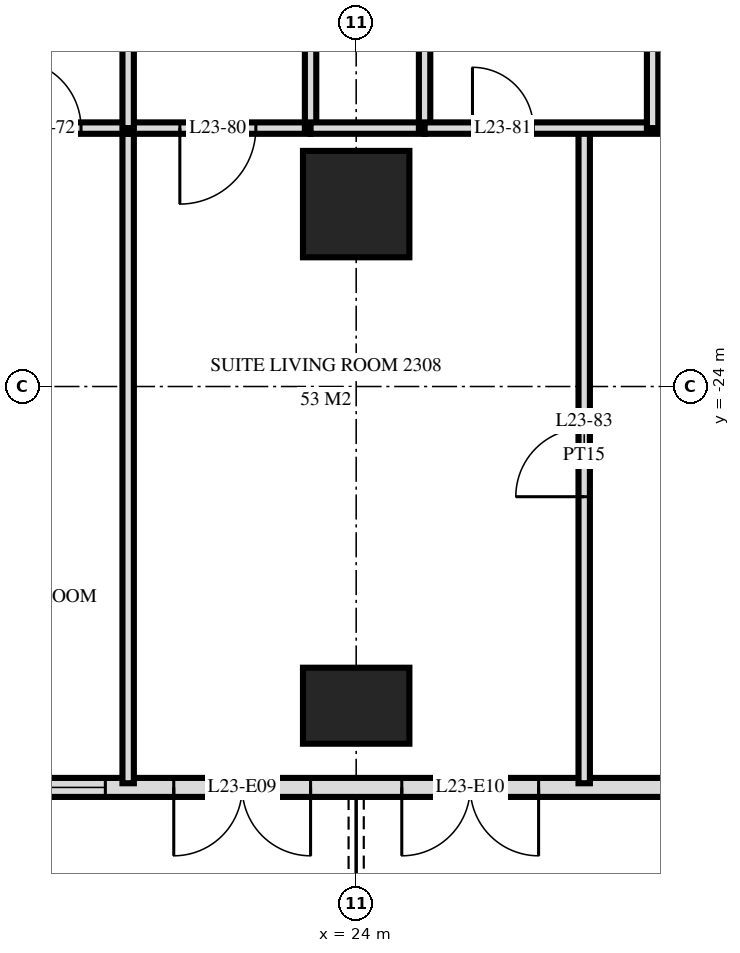
"""IFC4 building model, lengths in metres.
Left out: names, types, materials, properties, quantities, classifications, styles, units other than length and angle.
Written with IfcOpenShell. Run it as: python <this file> out.ifc"""

import sys

from ifc_helpers import new_model, si_unit, direction, frame, frame_2d, origin, origin_2d, place, context, subcontext, project, spatial, rectangle, extrude, element, fill, save


model = new_model("IFC4")
c1 = context("Model", 3, precision=1e-05, world=origin(), true_north=direction((0.0, 1.0)))
c2 = subcontext(c1, "Body", "Model", "MODEL_VIEW")
j1 = project(units=[si_unit("LENGTHUNIT", "METRE"), si_unit("PLANEANGLEUNIT", "RADIAN")], contexts=[c1])
p1 = place(None, origin())
s1 = spatial("IfcSite", under=j1, at=p1, CompositionType="ELEMENT")
p2 = place(p1, origin())
s2 = spatial("IfcBuilding", under=s1, at=p2, CompositionType="ELEMENT")
p3 = place(p2, frame((0.0, 0.0, 92.4)))
s3 = spatial("IfcBuildingStorey", under=s2, at=p3, CompositionType="ELEMENT", Elevation=92.4)
p4 = place(p3, frame((24.0, -28.2, 0.0), z_axis=(0.0, 0.0, 1.0), x_axis=(1.0, 0.0, 0.0)))
e1 = element("IfcColumn", 1, at=p4, inside=s3, PredefinedType="COLUMN", context=c2, shape_type="SweptSolid", body=[
    extrude(rectangle(XDim=1.4, YDim=1.0, at=origin_2d()), origin(), (0.0, 0.0, 1.0), 3.6),
])
p5 = place(p3, frame((24.0, -21.6, 0.0), z_axis=(0.0, 0.0, 1.0), x_axis=(1.0, 0.0, 0.0)))
e2 = element("IfcColumn", 2, at=p5, inside=s3, PredefinedType="COLUMN", context=c2, shape_type="SweptSolid", body=[
    extrude(rectangle(XDim=1.4, YDim=1.4, at=origin_2d()), origin(), (0.0, 0.0, 1.0), 3.6),
])
p6 = place(p3, frame((-28.775, -29.275, 0.0), z_axis=(0.0, 0.0, 1.0), x_axis=(1.0, 0.0, 0.0)))
e3 = element("IfcWall", 3, at=p6, inside=s3, PredefinedType="SOLIDWALL", context=c2, shape_type="SweptSolid", body=[
    extrude(rectangle(XDim=57.551, YDim=0.25, at=frame_2d((28.775, 0.0))), origin(), (0.0, 0.0, 1.0), 3.32),
])
p7 = place(p6, frame((0.575, 0.0, 0.0)))
e4 = element("IfcOpeningElement", 4, at=p7, cuts=e3, PredefinedType="OPENING", context=c2, shape_type="SweptSolid", body=[
    extrude(rectangle(XDim=1.8, YDim=2.4, at=frame_2d((0.9, 1.2))), frame((0.0, 0.135, 0.0), z_axis=(0.0, -1.0, 0.0), x_axis=(1.0, 0.0, 0.0)), (0.0, 0.0, 1.0), 0.27),
])
p8 = place(p6, frame((5.075, 0.0, 0.3)))
e5 = element("IfcOpeningElement", 5, at=p8, cuts=e3, PredefinedType="OPENING", context=c2, shape_type="SweptSolid", body=[
    extrude(rectangle(XDim=2.4, YDim=2.1, at=frame_2d((1.2, 1.05))), frame((0.0, 0.135, 0.0), z_axis=(0.0, -1.0, 0.0), x_axis=(1.0, 0.0, 0.0)), (0.0, 0.0, 1.0), 0.27),
])
p9 = place(p6, frame((8.375, 0.0, 0.0)))
e6 = element("IfcOpeningElement", 6, at=p9, cuts=e3, PredefinedType="OPENING", context=c2, shape_type="SweptSolid", body=[
    extrude(rectangle(XDim=1.8, YDim=2.4, at=frame_2d((0.9, 1.2))), frame((0.0, 0.135, 0.0), z_axis=(0.0, -1.0, 0.0), x_axis=(1.0, 0.0, 0.0)), (0.0, 0.0, 1.0), 0.27),
])
p10 = place(p6, frame((11.375, 0.0, 0.0)))
e7 = element("IfcOpeningElement", 7, at=p10, cuts=e3, PredefinedType="OPENING", context=c2, shape_type="SweptSolid", body=[
    extrude(rectangle(XDim=1.8, YDim=2.4, at=frame_2d((0.9, 1.2))), frame((0.0, 0.135, 0.0), z_axis=(0.0, -1.0, 0.0), x_axis=(1.0, 0.0, 0.0)), (0.0, 0.0, 1.0), 0.27),
])
p11 = place(p6, frame((14.075, 0.0, 0.3)))
e8 = element("IfcOpeningElement", 8, at=p11, cuts=e3, PredefinedType="OPENING", context=c2, shape_type="SweptSolid", body=[
    extrude(rectangle(XDim=2.4, YDim=2.1, at=frame_2d((1.2, 1.05))), frame((0.0, 0.135, 0.0), z_axis=(0.0, -1.0, 0.0), x_axis=(1.0, 0.0, 0.0)), (0.0, 0.0, 1.0), 0.27),
])
p12 = place(p6, frame((17.375, 0.0, 0.0)))
e9 = element("IfcOpeningElement", 9, at=p12, cuts=e3, PredefinedType="OPENING", context=c2, shape_type="SweptSolid", body=[
    extrude(rectangle(XDim=1.8, YDim=2.4, at=frame_2d((0.9, 1.2))), frame((0.0, 0.135, 0.0), z_axis=(0.0, -1.0, 0.0), x_axis=(1.0, 0.0, 0.0)), (0.0, 0.0, 1.0), 0.27),
])
p13 = place(p6, frame((20.075, 0.0, 0.3)))
e10 = element("IfcOpeningElement", 10, at=p13, cuts=e3, PredefinedType="OPENING", context=c2, shape_type="SweptSolid", body=[
    extrude(rectangle(XDim=2.4, YDim=2.1, at=frame_2d((1.2, 1.05))), frame((0.0, 0.135, 0.0), z_axis=(0.0, -1.0, 0.0), x_axis=(1.0, 0.0, 0.0)), (0.0, 0.0, 1.0), 0.27),
])
p14 = place(p6, frame((23.075, 0.0, 0.3)))
e11 = element("IfcOpeningElement", 11, at=p14, cuts=e3, PredefinedType="OPENING", context=c2, shape_type="SweptSolid", body=[
    extrude(rectangle(XDim=2.4, YDim=2.1, at=frame_2d((1.2, 1.05))), frame((0.0, 0.135, 0.0), z_axis=(0.0, -1.0, 0.0), x_axis=(1.0, 0.0, 0.0)), (0.0, 0.0, 1.0), 0.27),
])
p15 = place(p6, frame((26.375, 0.0, 0.0)))
e12 = element("IfcOpeningElement", 12, at=p15, cuts=e3, PredefinedType="OPENING", context=c2, shape_type="SweptSolid", body=[
    extrude(rectangle(XDim=1.8, YDim=2.4, at=frame_2d((0.9, 1.2))), frame((0.0, 0.135, 0.0), z_axis=(0.0, -1.0, 0.0), x_axis=(1.0, 0.0, 0.0)), (0.0, 0.0, 1.0), 0.27),
])
p16 = place(p6, frame((29.375, 0.0, 0.0)))
e13 = element("IfcOpeningElement", 13, at=p16, cuts=e3, PredefinedType="OPENING", context=c2, shape_type="SweptSolid", body=[
    extrude(rectangle(XDim=1.8, YDim=2.4, at=frame_2d((0.9, 1.2))), frame((0.0, 0.135, 0.0), z_axis=(0.0, -1.0, 0.0), x_axis=(1.0, 0.0, 0.0)), (0.0, 0.0, 1.0), 0.27),
])
p17 = place(p6, frame((32.075, 0.0, 0.3)))
e14 = element("IfcOpeningElement", 14, at=p17, cuts=e3, PredefinedType="OPENING", context=c2, shape_type="SweptSolid", body=[
    extrude(rectangle(XDim=2.4, YDim=2.1, at=frame_2d((1.2, 1.05))), frame((0.0, 0.135, 0.0), z_axis=(0.0, -1.0, 0.0), x_axis=(1.0, 0.0, 0.0)), (0.0, 0.0, 1.0), 0.27),
])
p18 = place(p6, frame((35.375, 0.0, 0.0)))
e15 = element("IfcOpeningElement", 15, at=p18, cuts=e3, PredefinedType="OPENING", context=c2, shape_type="SweptSolid", body=[
    extrude(rectangle(XDim=1.8, YDim=2.4, at=frame_2d((0.9, 1.2))), frame((0.0, 0.135, 0.0), z_axis=(0.0, -1.0, 0.0), x_axis=(1.0, 0.0, 0.0)), (0.0, 0.0, 1.0), 0.27),
])
p19 = place(p6, frame((38.075, 0.0, 0.3)))
e16 = element("IfcOpeningElement", 16, at=p19, cuts=e3, PredefinedType="OPENING", context=c2, shape_type="SweptSolid", body=[
    extrude(rectangle(XDim=2.4, YDim=2.1, at=frame_2d((1.2, 1.05))), frame((0.0, 0.135, 0.0), z_axis=(0.0, -1.0, 0.0), x_axis=(1.0, 0.0, 0.0)), (0.0, 0.0, 1.0), 0.27),
])
p20 = place(p6, frame((41.075, 0.0, 0.3)))
e17 = element("IfcOpeningElement", 17, at=p20, cuts=e3, PredefinedType="OPENING", context=c2, shape_type="SweptSolid", body=[
    extrude(rectangle(XDim=2.4, YDim=2.1, at=frame_2d((1.2, 1.05))), frame((0.0, 0.135, 0.0), z_axis=(0.0, -1.0, 0.0), x_axis=(1.0, 0.0, 0.0)), (0.0, 0.0, 1.0), 0.27),
])
p21 = place(p6, frame((44.375, 0.0, 0.0)))
e18 = element("IfcOpeningElement", 18, at=p21, cuts=e3, PredefinedType="OPENING", context=c2, shape_type="SweptSolid", body=[
    extrude(rectangle(XDim=1.8, YDim=2.4, at=frame_2d((0.9, 1.2))), frame((0.0, 0.135, 0.0), z_axis=(0.0, -1.0, 0.0), x_axis=(1.0, 0.0, 0.0)), (0.0, 0.0, 1.0), 0.27),
])
p22 = place(p6, frame((47.075, 0.0, 0.3)))
e19 = element("IfcOpeningElement", 19, at=p22, cuts=e3, PredefinedType="OPENING", context=c2, shape_type="SweptSolid", body=[
    extrude(rectangle(XDim=2.4, YDim=2.1, at=frame_2d((1.2, 1.05))), frame((0.0, 0.135, 0.0), z_axis=(0.0, -1.0, 0.0), x_axis=(1.0, 0.0, 0.0)), (0.0, 0.0, 1.0), 0.27),
])
p23 = place(p6, frame((50.375, 0.0, 0.0)))
e20 = element("IfcOpeningElement", 20, at=p23, cuts=e3, PredefinedType="OPENING", context=c2, shape_type="SweptSolid", body=[
    extrude(rectangle(XDim=1.8, YDim=2.4, at=frame_2d((0.9, 1.2))), frame((0.0, 0.135, 0.0), z_axis=(0.0, -1.0, 0.0), x_axis=(1.0, 0.0, 0.0)), (0.0, 0.0, 1.0), 0.27),
])
p24 = place(p6, frame((53.375, 0.0, 0.0)))
e21 = element("IfcOpeningElement", 21, at=p24, cuts=e3, PredefinedType="OPENING", context=c2, shape_type="SweptSolid", body=[
    extrude(rectangle(XDim=1.8, YDim=2.4, at=frame_2d((0.9, 1.2))), frame((0.0, 0.135, 0.0), z_axis=(0.0, -1.0, 0.0), x_axis=(1.0, 0.0, 0.0)), (0.0, 0.0, 1.0), 0.27),
])
p25 = place(p3, frame((27.9, -20.6, 0.0), z_axis=(0.0, 0.0, 1.0), x_axis=(0.0, 1.0, 0.0)))
e22 = element("IfcWall", 22, at=p25, inside=s3, PredefinedType="PARTITIONING", context=c2, shape_type="SweptSolid", body=[
    extrude(rectangle(XDim=3.6, YDim=0.15, at=frame_2d((1.8, 0.0))), origin(), (0.0, 0.0, 1.0), 3.32),
])
p26 = place(p3, frame((27.0, -29.22, 0.0), z_axis=(0.0, 0.0, 1.0), x_axis=(0.0, 1.0, 0.0)))
e23 = element("IfcWall", 23, at=p26, inside=s3, PredefinedType="PARTITIONING", context=c2, shape_type="SweptSolid", body=[
    extrude(rectangle(XDim=8.62, YDim=0.15, at=frame_2d((4.31, 0.0))), origin(), (0.0, 0.0, 1.0), 3.32),
])
p27 = place(p26, frame((3.77, 0.0, 0.0)))
e24 = element("IfcOpeningElement", 24, at=p27, cuts=e23, PredefinedType="OPENING", context=c2, shape_type="SweptSolid", body=[
    extrude(rectangle(XDim=0.9, YDim=2.1, at=frame_2d((0.45, 1.05))), frame((0.0, 0.085, 0.0), z_axis=(0.0, -1.0, 0.0), x_axis=(1.0, 0.0, 0.0)), (0.0, 0.0, 1.0), 0.17),
])
p28 = place(p3, frame((24.9, -20.6, 0.0), z_axis=(0.0, 0.0, 1.0), x_axis=(0.0, 1.0, 0.0)))
e25 = element("IfcWall", 25, at=p28, inside=s3, PredefinedType="PLUMBINGWALL", context=c2, shape_type="SweptSolid", body=[
    extrude(rectangle(XDim=3.6, YDim=0.15, at=frame_2d((1.8, 0.0))), origin(), (0.0, 0.0, 1.0), 3.32),
])
p29 = place(p3, frame((23.4, -20.6, 0.0), z_axis=(0.0, 0.0, 1.0), x_axis=(0.0, 1.0, 0.0)))
e26 = element("IfcWall", 26, at=p29, inside=s3, PredefinedType="PARTITIONING", context=c2, shape_type="SweptSolid", body=[
    extrude(rectangle(XDim=3.6, YDim=0.15, at=frame_2d((1.8, 0.0))), origin(), (0.0, 0.0, 1.0), 3.32),
])
p30 = place(p29, frame((1.32, 0.0, 0.0)))
e27 = element("IfcOpeningElement", 27, at=p30, cuts=e26, PredefinedType="OPENING", context=c2, shape_type="SweptSolid", body=[
    extrude(rectangle(XDim=1.0, YDim=2.1, at=frame_2d((0.5, 1.05))), frame((0.0, 0.085, 0.0), z_axis=(0.0, -1.0, 0.0), x_axis=(1.0, 0.0, 0.0)), (0.0, 0.0, 1.0), 0.17),
])
p31 = place(p3, frame((21.0, -20.6, 0.0), z_axis=(0.0, 0.0, 1.0), x_axis=(0.0, 1.0, 0.0)))
e28 = element("IfcWall", 28, at=p31, inside=s3, PredefinedType="PARTITIONING", context=c2, shape_type="SweptSolid", body=[
    extrude(rectangle(XDim=3.6, YDim=0.15, at=frame_2d((1.8, 0.0))), origin(), (0.0, 0.0, 1.0), 3.32),
])
p32 = place(p3, frame((21.0, -29.22, 0.0), z_axis=(0.0, 0.0, 1.0), x_axis=(0.0, 1.0, 0.0)))
e29 = element("IfcWall", 29, at=p32, inside=s3, PredefinedType="PARTITIONING", context=c2, shape_type="SweptSolid", body=[
    extrude(rectangle(XDim=8.62, YDim=0.15, at=frame_2d((4.31, 0.0))), origin(), (0.0, 0.0, 1.0), 3.32),
])
p33 = place(p3, frame((21.0, -20.6, 0.0), z_axis=(0.0, 0.0, 1.0), x_axis=(1.0, 0.0, 0.0)))
e30 = element("IfcWall", 30, at=p33, inside=s3, PredefinedType="PARTITIONING", context=c2, shape_type="SweptSolid", body=[
    extrude(rectangle(XDim=2.4, YDim=0.15, at=frame_2d((1.2, 0.0))), origin(), (0.0, 0.0, 1.0), 3.32),
])
p34 = place(p33, frame((0.68, 0.0, 0.0)))
e31 = element("IfcOpeningElement", 31, at=p34, cuts=e30, PredefinedType="OPENING", context=c2, shape_type="SweptSolid", body=[
    extrude(rectangle(XDim=1.0, YDim=2.1, at=frame_2d((0.5, 1.05))), frame((0.0, 0.085, 0.0), z_axis=(0.0, -1.0, 0.0), x_axis=(1.0, 0.0, 0.0)), (0.0, 0.0, 1.0), 0.17),
])
p35 = place(p3, frame((15.9, -20.6, 0.0), z_axis=(0.0, 0.0, 1.0), x_axis=(1.0, 0.0, 0.0)))
e32 = element("IfcWall", 32, at=p35, inside=s3, PredefinedType="PARTITIONING", context=c2, shape_type="SweptSolid", body=[
    extrude(rectangle(XDim=5.1, YDim=0.15, at=frame_2d((2.55, 0.0))), origin(), (0.0, 0.0, 1.0), 3.32),
])
p36 = place(p35, frame((0.5, 0.0, 0.0)))
e33 = element("IfcOpeningElement", 33, at=p36, cuts=e32, PredefinedType="OPENING", context=c2, shape_type="SweptSolid", body=[
    extrude(rectangle(XDim=0.8, YDim=2.1, at=frame_2d((0.4, 1.05))), frame((0.0, 0.085, 0.0), z_axis=(0.0, -1.0, 0.0), x_axis=(1.0, 0.0, 0.0)), (0.0, 0.0, 1.0), 0.17),
])
p37 = place(p35, frame((3.58, 0.0, 0.0)))
e34 = element("IfcOpeningElement", 34, at=p37, cuts=e32, PredefinedType="OPENING", context=c2, shape_type="SweptSolid", body=[
    extrude(rectangle(XDim=0.9, YDim=2.1, at=frame_2d((0.45, 1.05))), frame((0.0, 0.085, 0.0), z_axis=(0.0, -1.0, 0.0), x_axis=(1.0, 0.0, 0.0)), (0.0, 0.0, 1.0), 0.17),
])
p38 = place(p3, frame((24.9, -20.6, 0.0), z_axis=(0.0, 0.0, 1.0), x_axis=(1.0, 0.0, 0.0)))
e35 = element("IfcWall", 35, at=p38, inside=s3, PredefinedType="PARTITIONING", context=c2, shape_type="SweptSolid", body=[
    extrude(rectangle(XDim=8.22, YDim=0.15, at=frame_2d((4.11, 0.0))), origin(), (0.0, 0.0, 1.0), 3.32),
])
p39 = place(p38, frame((0.63, 0.0, 0.0)))
e36 = element("IfcOpeningElement", 36, at=p39, cuts=e35, PredefinedType="OPENING", context=c2, shape_type="SweptSolid", body=[
    extrude(rectangle(XDim=0.8, YDim=2.1, at=frame_2d((0.4, 1.05))), frame((0.0, 0.085, 0.0), z_axis=(0.0, -1.0, 0.0), x_axis=(1.0, 0.0, 0.0)), (0.0, 0.0, 1.0), 0.17),
])
p40 = place(p38, frame((3.4, 0.0, 0.0)))
e37 = element("IfcOpeningElement", 37, at=p40, cuts=e35, PredefinedType="OPENING", context=c2, shape_type="SweptSolid", body=[
    extrude(rectangle(XDim=0.9, YDim=2.1, at=frame_2d((0.45, 1.05))), frame((0.0, 0.085, 0.0), z_axis=(0.0, -1.0, 0.0), x_axis=(1.0, 0.0, 0.0)), (0.0, 0.0, 1.0), 0.17),
])
p41 = place(p3, frame((23.4, -20.6, 0.0), z_axis=(0.0, 0.0, 1.0), x_axis=(1.0, 0.0, 0.0)))
e38 = element("IfcWall", 38, at=p41, inside=s3, PredefinedType="PLUMBINGWALL", context=c2, shape_type="SweptSolid", body=[
    extrude(rectangle(XDim=1.5, YDim=0.15, at=frame_2d((0.75, 0.0))), origin(), (0.0, 0.0, 1.0), 3.32),
])
p42 = place(p22, origin())
e39 = element("IfcWindow", 39, at=p42, inside=s3, PartitioningType="SINGLE_PANEL", PredefinedType="WINDOW", context=c2, shape_type="SweptSolid", body=[
    extrude(rectangle(XDim=2.4, YDim=2.1, at=frame_2d((1.2, 1.05))), frame((0.0, 0.03, 0.0), z_axis=(0.0, -1.0, 0.0), x_axis=(1.0, 0.0, 0.0)), (0.0, 0.0, 1.0), 0.06),
])
fill(e19, e39)
p43 = place(p23, frame((0.9, 0.0, 0.0), z_axis=(0.0, 0.0, 1.0), x_axis=(-1.0, 0.0, 0.0)))
e40 = element("IfcDoor", 40, at=p43, inside=s3, OperationType="DOUBLE_DOOR_SINGLE_SWING", PredefinedType="DOOR", context=c2, shape_type="SweptSolid", body=[
    extrude(rectangle(XDim=1.8, YDim=2.4, at=frame_2d((0.0, 1.2))), frame((0.0, -0.025, 0.0), z_axis=(0.0, 1.0, 0.0), x_axis=(-1.0, 0.0, 0.0)), (0.0, 0.0, 1.0), 0.05),
])
fill(e20, e40)
p44 = place(p24, frame((0.9, 0.0, 0.0), z_axis=(0.0, 0.0, 1.0), x_axis=(-1.0, 0.0, 0.0)))
e41 = element("IfcDoor", 41, at=p44, inside=s3, OperationType="DOUBLE_DOOR_SINGLE_SWING", PredefinedType="DOOR", context=c2, shape_type="SweptSolid", body=[
    extrude(rectangle(XDim=1.8, YDim=2.4, at=frame_2d((0.0, 1.2))), frame((0.0, -0.025, 0.0), z_axis=(0.0, 1.0, 0.0), x_axis=(-1.0, 0.0, 0.0)), (0.0, 0.0, 1.0), 0.05),
])
fill(e21, e41)
p45 = place(p37, origin())
e42 = element("IfcDoor", 42, at=p45, inside=s3, OperationType="SINGLE_SWING_RIGHT", PredefinedType="DOOR", context=c2, shape_type="SweptSolid", body=[
    extrude(rectangle(XDim=0.9, YDim=2.1, at=frame_2d((0.45, 1.05))), frame((0.0, 0.025, 0.0), z_axis=(0.0, -1.0, 0.0), x_axis=(1.0, 0.0, 0.0)), (0.0, 0.0, 1.0), 0.05),
])
fill(e34, e42)
p46 = place(p34, frame((0.5, 0.0, 0.0), z_axis=(0.0, 0.0, 1.0), x_axis=(-1.0, 0.0, 0.0)))
e43 = element("IfcDoor", 43, at=p46, inside=s3, OperationType="SINGLE_SWING_LEFT", PredefinedType="DOOR", context=c2, shape_type="SweptSolid", body=[
    extrude(rectangle(XDim=1.0, YDim=2.1, at=frame_2d((0.0, 1.05))), frame((0.0, -0.025, 0.0), z_axis=(0.0, 1.0, 0.0), x_axis=(-1.0, 0.0, 0.0)), (0.0, 0.0, 1.0), 0.05),
])
fill(e31, e43)
p47 = place(p39, origin())
e44 = element("IfcDoor", 44, at=p47, inside=s3, OperationType="SINGLE_SWING_RIGHT", PredefinedType="DOOR", context=c2, shape_type="SweptSolid", body=[
    extrude(rectangle(XDim=0.8, YDim=2.1, at=frame_2d((0.4, 1.05))), frame((0.0, 0.025, 0.0), z_axis=(0.0, -1.0, 0.0), x_axis=(1.0, 0.0, 0.0)), (0.0, 0.0, 1.0), 0.05),
])
fill(e36, e44)
p48 = place(p27, origin())
e45 = element("IfcDoor", 45, at=p48, inside=s3, OperationType="SINGLE_SWING_RIGHT", PredefinedType="DOOR", context=c2, shape_type="SweptSolid", body=[
    extrude(rectangle(XDim=0.9, YDim=2.1, at=frame_2d((0.45, 1.05))), frame((0.0, 0.025, 0.0), z_axis=(0.0, -1.0, 0.0), x_axis=(1.0, 0.0, 0.0)), (0.0, 0.0, 1.0), 0.05),
])
fill(e24, e45)
save(model, sys.argv[1])
